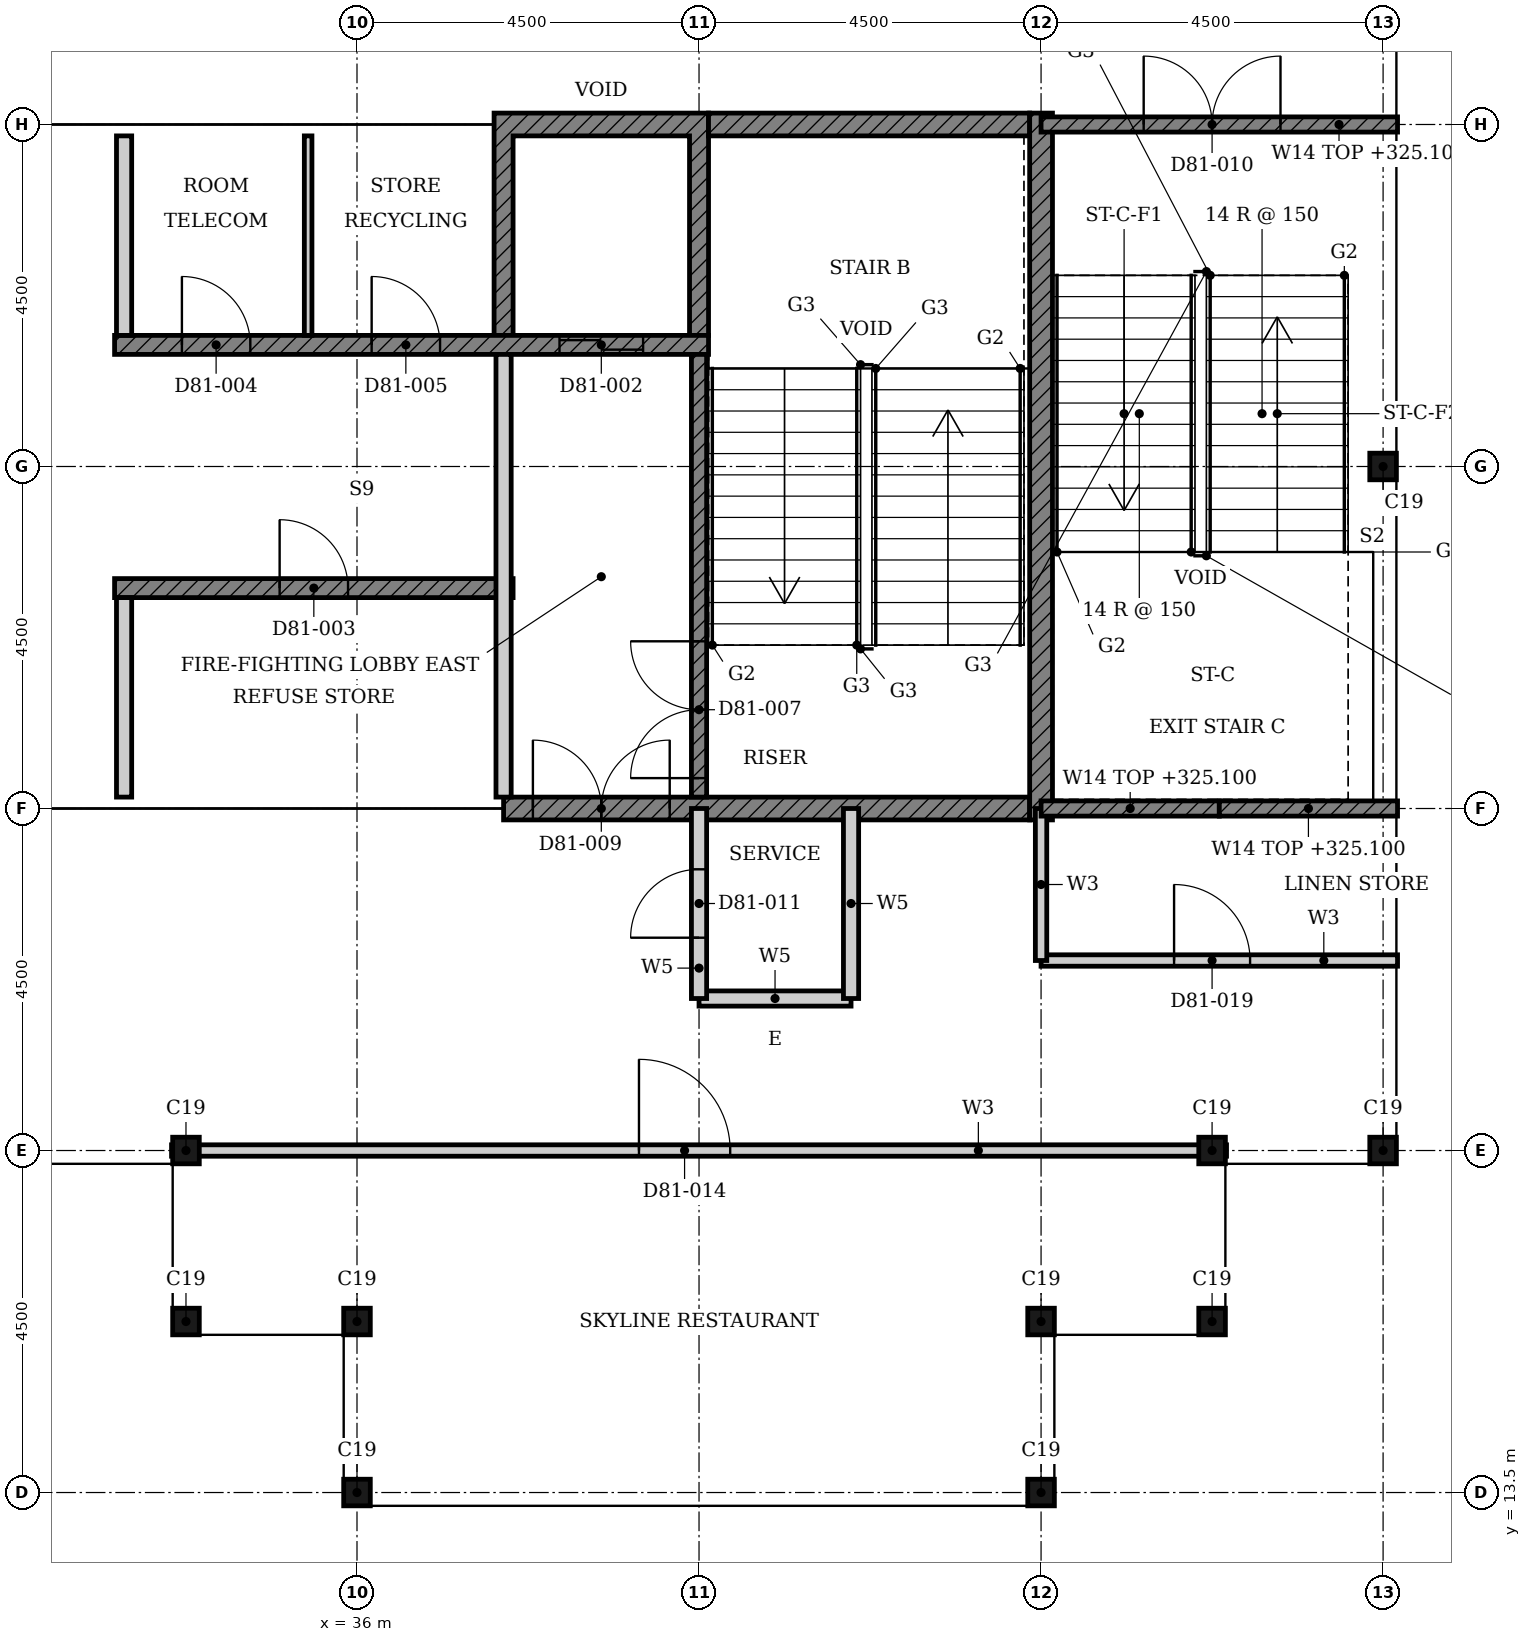
"""IFC4 building model, lengths in metres.
Left out: names, types, materials, properties, quantities, classifications, styles, units other than length and angle.
Written with IfcOpenShell. Run it as: python <this file> out.ifc"""

import sys

from ifc_helpers import new_model, si_unit, direction, frame, frame_2d, origin, origin_2d, place, context, subcontext, project, spatial, polyline, rectangle, i_section, outline, extrude, element, fill, save


model = new_model("IFC4")
c1 = context("Model", 3, precision=1e-05, world=origin(), true_north=direction((0.0, 1.0)))
c2 = subcontext(c1, "Body", "Model", "MODEL_VIEW")
j1 = project(units=[si_unit("LENGTHUNIT", "METRE"), si_unit("PLANEANGLEUNIT", "RADIAN")], contexts=[c1])
p1 = place(None, origin())
s1 = spatial("IfcSite", under=j1, at=p1, CompositionType="ELEMENT")
p2 = place(p1, origin())
s2 = spatial("IfcBuilding", under=s1, at=p2, CompositionType="ELEMENT")
p3 = place(p2, frame((0.0, 0.0, 321.2)))
s3 = spatial("IfcBuildingStorey", under=s2, at=p3, CompositionType="ELEMENT", Elevation=321.2)
for number, where, z_axis, x_axis in (
    (1, (45.0, 13.5, 0.0), (0.0, 0.0, 1.0), (1.0, 0.0, 0.0)),
    (2, (45.0, 15.75, 0.0), (0.0, 0.0, 1.0), (1.0, 0.0, 0.0)),
    (3, (47.25, 15.75, 0.0), (0.0, 0.0, 1.0), (1.0, 0.0, 0.0)),
    (4, (47.25, 18.0, 0.0), (0.0, 0.0, 1.0), (1.0, 0.0, 0.0)),
    (5, (49.5, 18.0, 0.0), (0.0, 0.0, 1.0), (1.0, 0.0, 0.0)),
    (6, (49.5, 27.0, 0.0), (0.0, 0.0, 1.0), (1.0, 0.0, 0.0)),
    (7, (33.75, 18.0, 0.0), (0.0, 0.0, 1.0), (1.0, 0.0, 0.0)),
    (8, (33.75, 15.75, 0.0), (0.0, 0.0, 1.0), (1.0, 0.0, 0.0)),
    (9, (36.0, 15.75, 0.0), (0.0, 0.0, 1.0), (1.0, 0.0, 0.0)),
    (10, (36.0, 13.5, 0.0), (0.0, 0.0, 1.0), (1.0, 0.0, 0.0)),
):
    element("IfcColumn", number, at=place(p3, frame(where, z_axis=z_axis, x_axis=x_axis)), inside=s3, PredefinedType="COLUMN", context=c2, shape_type="SweptSolid", body=[
        extrude(i_section(OverallWidth=0.35, OverallDepth=0.35, WebThickness=0.012, FlangeThickness=0.019, FilletRadius=0.013, at=origin_2d()), origin(), (0.0, 0.0, 1.0), 4.2),
    ])
p4 = place(p3, origin())
e11 = element("IfcWall", 11, at=p4, inside=s3, PredefinedType="SHEAR", context=c2, shape_type="SweptSolid", body=[
    extrude(outline(polyline([(37.803, 28.725), (38.053, 28.725), (38.053, 31.35), (40.375, 31.35), (40.375, 28.725), (40.625, 28.725), (40.625, 31.65), (37.803, 31.65), (37.803, 28.725)])), origin(), (0.0, 0.0, 1.0), 3.9),
])
p5 = place(p3, frame((37.928, 22.5, 0.0), z_axis=(0.0, 0.0, 1.0), x_axis=(1.0, 0.0, 0.0)))
e12 = element("IfcWall", 12, at=p5, inside=s3, PredefinedType="SHEAR", context=c2, shape_type="SweptSolid", body=[
    extrude(rectangle(XDim=6.922, YDim=0.3, at=frame_2d((3.461, 0.0))), origin(), (0.0, 0.0, 1.0), 3.1),
])
p6 = place(p5, frame((0.386, 0.0, 0.0)))
e13 = element("IfcOpeningElement", 13, at=p6, cuts=e12, PredefinedType="OPENING", context=c2, shape_type="SweptSolid", body=[
    extrude(rectangle(XDim=1.8, YDim=2.1, at=frame_2d((0.9, 1.05))), frame((0.0, 0.16, 0.0), z_axis=(0.0, -1.0, 0.0), x_axis=(1.0, 0.0, 0.0)), (0.0, 0.0, 1.0), 0.32),
])
p7 = place(p3, frame((40.625, 31.5, 0.0), z_axis=(0.0, 0.0, 1.0), x_axis=(1.0, 0.0, 0.0)))
e14 = element("IfcWall", 14, at=p7, inside=s3, PredefinedType="SHEAR", context=c2, shape_type="SweptSolid", body=[
    extrude(rectangle(XDim=4.225, YDim=0.3, at=frame_2d((2.113, 0.0))), origin(), (0.0, 0.0, 1.0), 3.1),
])
p8 = place(p3, frame((45.0, 22.35, 0.0), z_axis=(0.0, 0.0, 1.0), x_axis=(0.0, 1.0, 0.0)))
e15 = element("IfcWall", 15, at=p8, inside=s3, PredefinedType="SHEAR", context=c2, shape_type="SweptSolid", body=[
    extrude(rectangle(XDim=9.3, YDim=0.3, at=frame_2d((4.65, 0.0))), origin(), (0.0, 0.0, 1.0), 3.9),
])
p9 = place(p3, frame((32.811, 25.4, 0.0), z_axis=(0.0, 0.0, 1.0), x_axis=(1.0, 0.0, 0.0)))
e16 = element("IfcWall", 16, at=p9, inside=s3, PredefinedType="SHEAR", context=c2, shape_type="SweptSolid", body=[
    extrude(rectangle(XDim=5.243, YDim=0.25, at=frame_2d((2.621, 0.0))), origin(), (0.0, 0.0, 1.0), 3.9),
])
p10 = place(p9, frame((2.171, 0.0, 0.0)))
e17 = element("IfcOpeningElement", 17, at=p10, cuts=e16, PredefinedType="OPENING", context=c2, shape_type="SweptSolid", body=[
    extrude(rectangle(XDim=0.9, YDim=2.1, at=frame_2d((0.45, 1.05))), frame((0.0, 0.135, 0.0), z_axis=(0.0, -1.0, 0.0), x_axis=(1.0, 0.0, 0.0)), (0.0, 0.0, 1.0), 0.27),
])
p11 = place(p3, frame((32.811, 28.6, 0.0), z_axis=(0.0, 0.0, 1.0), x_axis=(1.0, 0.0, 0.0)))
e18 = element("IfcWall", 18, at=p11, inside=s3, PredefinedType="SHEAR", context=c2, shape_type="SweptSolid", body=[
    extrude(rectangle(XDim=7.814, YDim=0.25, at=frame_2d((3.907, 0.0))), origin(), (0.0, 0.0, 1.0), 3.9),
])
p12 = place(p11, frame((5.854, 0.0, 0.0)))
e19 = element("IfcOpeningElement", 19, at=p12, cuts=e18, PredefinedType="OPENING", context=c2, shape_type="SweptSolid", body=[
    extrude(rectangle(XDim=1.1, YDim=2.1, at=frame_2d((0.55, 1.05))), frame((0.0, 0.135, 0.0), z_axis=(0.0, -1.0, 0.0), x_axis=(1.0, 0.0, 0.0)), (0.0, 0.0, 1.0), 0.27),
])
p13 = place(p11, frame((0.886, 0.0, 0.0)))
e20 = element("IfcOpeningElement", 20, at=p13, cuts=e18, PredefinedType="OPENING", context=c2, shape_type="SweptSolid", body=[
    extrude(rectangle(XDim=0.9, YDim=2.1, at=frame_2d((0.45, 1.05))), frame((0.0, 0.135, 0.0), z_axis=(0.0, -1.0, 0.0), x_axis=(1.0, 0.0, 0.0)), (0.0, 0.0, 1.0), 0.27),
])
p14 = place(p11, frame((3.382, 0.0, 0.0)))
e21 = element("IfcOpeningElement", 21, at=p14, cuts=e18, PredefinedType="OPENING", context=c2, shape_type="SweptSolid", body=[
    extrude(rectangle(XDim=0.9, YDim=2.1, at=frame_2d((0.45, 1.05))), frame((0.0, 0.135, 0.0), z_axis=(0.0, -1.0, 0.0), x_axis=(1.0, 0.0, 0.0)), (0.0, 0.0, 1.0), 0.27),
])
for number, where, z_axis, x_axis in (
    (22, (32.936, 22.65, 0.0), (0.0, 0.0, 1.0), (0.0, 1.0, 0.0)),
    (23, (32.936, 28.725, 0.0), (0.0, 0.0, 1.0), (0.0, 1.0, 0.0)),
):
    element("IfcWall", number, at=place(p3, frame(where, z_axis=z_axis, x_axis=x_axis)), inside=s3, PredefinedType="PARTITIONING", context=c2, shape_type="SweptSolid", body=[
        extrude(rectangle(XDim=2.625, YDim=0.2, at=frame_2d((1.312, 0.0))), origin(), (0.0, 0.0, 1.0), 3.9),
    ])
p15 = place(p3, frame((35.357, 28.725, 0.0), z_axis=(0.0, 0.0, 1.0), x_axis=(0.0, 1.0, 0.0)))
e24 = element("IfcWall", 24, at=p15, inside=s3, PredefinedType="PARTITIONING", context=c2, shape_type="SweptSolid", body=[
    extrude(rectangle(XDim=2.625, YDim=0.1, at=frame_2d((1.312, 0.0))), origin(), (0.0, 0.0, 1.0), 3.9),
])
p16 = place(p3, frame((40.5, 22.65, 0.0), z_axis=(0.0, 0.0, 1.0), x_axis=(0.0, 1.0, 0.0)))
e25 = element("IfcWall", 25, at=p16, inside=s3, PredefinedType="SHEAR", context=c2, shape_type="SweptSolid", body=[
    extrude(rectangle(XDim=5.825, YDim=0.2, at=frame_2d((2.913, 0.0))), origin(), (0.0, 0.0, 1.0), 3.9),
])
p17 = place(p16, frame((0.25, 0.0, 0.0)))
e26 = element("IfcOpeningElement", 26, at=p17, cuts=e25, PredefinedType="OPENING", context=c2, shape_type="SweptSolid", body=[
    extrude(rectangle(XDim=1.8, YDim=2.1, at=frame_2d((0.9, 1.05))), frame((0.0, 0.11, 0.0), z_axis=(0.0, -1.0, 0.0), x_axis=(1.0, 0.0, 0.0)), (0.0, 0.0, 1.0), 0.22),
])
p18 = place(p3, frame((37.928, 22.65, 0.0), z_axis=(0.0, 0.0, 1.0), x_axis=(0.0, 1.0, 0.0)))
e27 = element("IfcWall", 27, at=p18, inside=s3, PredefinedType="PARTITIONING", context=c2, shape_type="SweptSolid", body=[
    extrude(rectangle(XDim=5.825, YDim=0.2, at=frame_2d((2.913, 0.0))), origin(), (0.0, 0.0, 1.0), 3.9),
])
p19 = place(p3, frame((33.56, 18.0, 0.0), z_axis=(0.0, 0.0, 1.0), x_axis=(1.0, 0.0, 0.0)))
e28 = element("IfcWall", 28, at=p19, inside=s3, PredefinedType="PARTITIONING", context=c2, shape_type="SweptSolid", body=[
    extrude(rectangle(XDim=13.88, YDim=0.15, at=frame_2d((6.94, 0.0))), origin(), (0.0, 0.0, 1.0), 3.08),
])
p20 = place(p19, frame((6.15, 0.0, 0.0)))
e29 = element("IfcOpeningElement", 29, at=p20, cuts=e28, PredefinedType="OPENING", context=c2, shape_type="SweptSolid", body=[
    extrude(rectangle(XDim=1.2, YDim=2.4, at=frame_2d((0.6, 1.2))), frame((0.0, 0.085, 0.0), z_axis=(0.0, -1.0, 0.0), x_axis=(1.0, 0.0, 0.0)), (0.0, 0.0, 1.0), 0.17),
])
p21 = place(p3, frame((45.0, 20.5, 0.0), z_axis=(0.0, 0.0, 1.0), x_axis=(1.0, 0.0, 0.0)))
e30 = element("IfcWall", 30, at=p21, inside=s3, PredefinedType="PARTITIONING", context=c2, shape_type="SweptSolid", body=[
    extrude(rectangle(XDim=4.69, YDim=0.15, at=frame_2d((2.345, 0.0))), origin(), (0.0, 0.0, 1.0), 3.9),
])
p22 = place(p21, frame((1.75, 0.0, 0.0)))
e31 = element("IfcOpeningElement", 31, at=p22, cuts=e30, PredefinedType="OPENING", context=c2, shape_type="SweptSolid", body=[
    extrude(rectangle(XDim=1.0, YDim=2.1, at=frame_2d((0.5, 1.05))), frame((0.0, 0.085, 0.0), z_axis=(0.0, -1.0, 0.0), x_axis=(1.0, 0.0, 0.0)), (0.0, 0.0, 1.0), 0.17),
])
p23 = place(p3, frame((45.0, 20.5, 0.0), z_axis=(0.0, 0.0, 1.0), x_axis=(0.0, 1.0, 0.0)))
e32 = element("IfcWall", 32, at=p23, inside=s3, PredefinedType="PARTITIONING", context=c2, shape_type="SweptSolid", body=[
    extrude(rectangle(XDim=2.0, YDim=0.15, at=frame_2d((1.0, 0.0))), origin(), (0.0, 0.0, 1.0), 3.9),
])
p24 = place(p3, frame((40.5, 20.0, 0.0), z_axis=(0.0, 0.0, 1.0), x_axis=(1.0, 0.0, 0.0)))
e33 = element("IfcWall", 33, at=p24, inside=s3, PredefinedType="PARTITIONING", context=c2, shape_type="SweptSolid", body=[
    extrude(rectangle(XDim=2.0, YDim=0.2, at=frame_2d((1.0, 0.0))), origin(), (0.0, 0.0, 1.0), 3.9),
])
p25 = place(p3, frame((40.5, 20.0, 0.0), z_axis=(0.0, 0.0, 1.0), x_axis=(0.0, 1.0, 0.0)))
e34 = element("IfcWall", 34, at=p25, inside=s3, PredefinedType="PARTITIONING", context=c2, shape_type="SweptSolid", body=[
    extrude(rectangle(XDim=2.5, YDim=0.2, at=frame_2d((1.25, 0.0))), origin(), (0.0, 0.0, 1.0), 3.9),
])
p26 = place(p25, frame((0.8, 0.0, 0.0)))
e35 = element("IfcOpeningElement", 35, at=p26, cuts=e34, PredefinedType="OPENING", context=c2, shape_type="SweptSolid", body=[
    extrude(rectangle(XDim=0.9, YDim=2.1, at=frame_2d((0.45, 1.05))), frame((0.0, 0.11, 0.0), z_axis=(0.0, -1.0, 0.0), x_axis=(1.0, 0.0, 0.0)), (0.0, 0.0, 1.0), 0.22),
])
p27 = place(p3, frame((42.5, 20.0, 0.0), z_axis=(0.0, 0.0, 1.0), x_axis=(0.0, 1.0, 0.0)))
e36 = element("IfcWall", 36, at=p27, inside=s3, PredefinedType="PARTITIONING", context=c2, shape_type="SweptSolid", body=[
    extrude(rectangle(XDim=2.5, YDim=0.2, at=frame_2d((1.25, 0.0))), origin(), (0.0, 0.0, 1.0), 3.9),
])
p28 = place(p3, frame((45.0, 22.5, 0.0), z_axis=(0.0, 0.0, 1.0), x_axis=(1.0, 0.0, 0.0)))
e37 = element("IfcWall", 37, at=p28, inside=s3, PredefinedType="SHEAR", context=c2, shape_type="SweptSolid", body=[
    extrude(rectangle(XDim=2.345, YDim=0.2, at=frame_2d((1.172, 0.0))), origin(), (0.0, 0.0, 1.0), 3.9),
])
p29 = place(p3, frame((45.0, 31.5, 0.0), z_axis=(0.0, 0.0, 1.0), x_axis=(1.0, 0.0, 0.0)))
e38 = element("IfcWall", 38, at=p29, inside=s3, PredefinedType="SHEAR", context=c2, shape_type="SweptSolid", body=[
    extrude(rectangle(XDim=4.69, YDim=0.2, at=frame_2d((2.345, 0.0))), origin(), (0.0, 0.0, 1.0), 3.9),
])
p30 = place(p29, frame((1.35, 0.0, 0.0)))
e39 = element("IfcOpeningElement", 39, at=p30, cuts=e38, PredefinedType="OPENING", context=c2, shape_type="SweptSolid", body=[
    extrude(rectangle(XDim=1.8, YDim=2.1, at=frame_2d((0.9, 1.05))), frame((0.0, 0.11, 0.0), z_axis=(0.0, -1.0, 0.0), x_axis=(1.0, 0.0, 0.0)), (0.0, 0.0, 1.0), 0.22),
])
p31 = place(p3, frame((47.345, 22.5, 0.0), z_axis=(0.0, 0.0, 1.0), x_axis=(1.0, 0.0, 0.0)))
e40 = element("IfcWall", 40, at=p31, inside=s3, PredefinedType="SHEAR", context=c2, shape_type="SweptSolid", body=[
    extrude(rectangle(XDim=2.345, YDim=0.2, at=frame_2d((1.172, 0.0))), origin(), (0.0, 0.0, 1.0), 3.9),
])
p32 = place(p12, origin())
e41 = element("IfcDoor", 41, at=p32, inside=s3, OperationType="DOUBLE_DOOR_SLIDING", PredefinedType="DOOR", context=c2, shape_type="SweptSolid", body=[
    extrude(rectangle(XDim=1.1, YDim=2.1, at=frame_2d((0.55, 1.05))), frame((0.0, 0.025, 0.0), z_axis=(0.0, -1.0, 0.0), x_axis=(1.0, 0.0, 0.0)), (0.0, 0.0, 1.0), 0.05),
])
fill(e19, e41)
p33 = place(p10, origin())
e42 = element("IfcDoor", 42, at=p33, inside=s3, OperationType="SINGLE_SWING_LEFT", PredefinedType="DOOR", context=c2, shape_type="SweptSolid", body=[
    extrude(rectangle(XDim=0.9, YDim=2.1, at=frame_2d((0.45, 1.05))), frame((0.0, 0.025, 0.0), z_axis=(0.0, -1.0, 0.0), x_axis=(1.0, 0.0, 0.0)), (0.0, 0.0, 1.0), 0.05),
])
fill(e17, e42)
p34 = place(p13, origin())
e43 = element("IfcDoor", 43, at=p34, inside=s3, OperationType="SINGLE_SWING_LEFT", PredefinedType="DOOR", context=c2, shape_type="SweptSolid", body=[
    extrude(rectangle(XDim=0.9, YDim=2.1, at=frame_2d((0.45, 1.05))), frame((0.0, 0.025, 0.0), z_axis=(0.0, -1.0, 0.0), x_axis=(1.0, 0.0, 0.0)), (0.0, 0.0, 1.0), 0.05),
])
fill(e20, e43)
p35 = place(p14, origin())
e44 = element("IfcDoor", 44, at=p35, inside=s3, OperationType="SINGLE_SWING_LEFT", PredefinedType="DOOR", context=c2, shape_type="SweptSolid", body=[
    extrude(rectangle(XDim=0.9, YDim=2.1, at=frame_2d((0.45, 1.05))), frame((0.0, 0.025, 0.0), z_axis=(0.0, -1.0, 0.0), x_axis=(1.0, 0.0, 0.0)), (0.0, 0.0, 1.0), 0.05),
])
fill(e21, e44)
p36 = place(p17, origin())
e45 = element("IfcDoor", 45, at=p36, inside=s3, OperationType="DOUBLE_DOOR_SINGLE_SWING", PredefinedType="DOOR", context=c2, shape_type="SweptSolid", body=[
    extrude(rectangle(XDim=1.8, YDim=2.1, at=frame_2d((0.9, 1.05))), frame((0.0, 0.025, 0.0), z_axis=(0.0, -1.0, 0.0), x_axis=(1.0, 0.0, 0.0)), (0.0, 0.0, 1.0), 0.05),
])
fill(e26, e45)
p37 = place(p6, origin())
e46 = element("IfcDoor", 46, at=p37, inside=s3, OperationType="DOUBLE_DOOR_SINGLE_SWING", PredefinedType="DOOR", context=c2, shape_type="SweptSolid", body=[
    extrude(rectangle(XDim=1.8, YDim=2.1, at=frame_2d((0.9, 1.05))), frame((0.0, 0.025, 0.0), z_axis=(0.0, -1.0, 0.0), x_axis=(1.0, 0.0, 0.0)), (0.0, 0.0, 1.0), 0.05),
])
fill(e13, e46)
p38 = place(p30, origin())
e47 = element("IfcDoor", 47, at=p38, inside=s3, OperationType="DOUBLE_DOOR_SINGLE_SWING", PredefinedType="DOOR", context=c2, shape_type="SweptSolid", body=[
    extrude(rectangle(XDim=1.8, YDim=2.1, at=frame_2d((0.9, 1.05))), frame((0.0, 0.025, 0.0), z_axis=(0.0, -1.0, 0.0), x_axis=(1.0, 0.0, 0.0)), (0.0, 0.0, 1.0), 0.05),
])
fill(e39, e47)
p39 = place(p26, origin())
e48 = element("IfcDoor", 48, at=p39, inside=s3, OperationType="SINGLE_SWING_RIGHT", PredefinedType="DOOR", context=c2, shape_type="SweptSolid", body=[
    extrude(rectangle(XDim=0.9, YDim=2.1, at=frame_2d((0.45, 1.05))), frame((0.0, 0.025, 0.0), z_axis=(0.0, -1.0, 0.0), x_axis=(1.0, 0.0, 0.0)), (0.0, 0.0, 1.0), 0.05),
])
fill(e35, e48)
p40 = place(p20, origin())
e49 = element("IfcDoor", 49, at=p40, inside=s3, OperationType="SINGLE_SWING_LEFT", PredefinedType="DOOR", context=c2, shape_type="SweptSolid", body=[
    extrude(rectangle(XDim=1.2, YDim=2.4, at=frame_2d((0.6, 1.2))), frame((0.0, 0.025, 0.0), z_axis=(0.0, -1.0, 0.0), x_axis=(1.0, 0.0, 0.0)), (0.0, 0.0, 1.0), 0.05),
])
fill(e29, e49)
p41 = place(p22, origin())
e50 = element("IfcDoor", 50, at=p41, inside=s3, OperationType="SINGLE_SWING_RIGHT", PredefinedType="DOOR", context=c2, shape_type="SweptSolid", body=[
    extrude(rectangle(XDim=1.0, YDim=2.1, at=frame_2d((0.5, 1.05))), frame((0.0, 0.025, 0.0), z_axis=(0.0, -1.0, 0.0), x_axis=(1.0, 0.0, 0.0)), (0.0, 0.0, 1.0), 0.05),
])
fill(e31, e50)
save(model, sys.argv[1])
